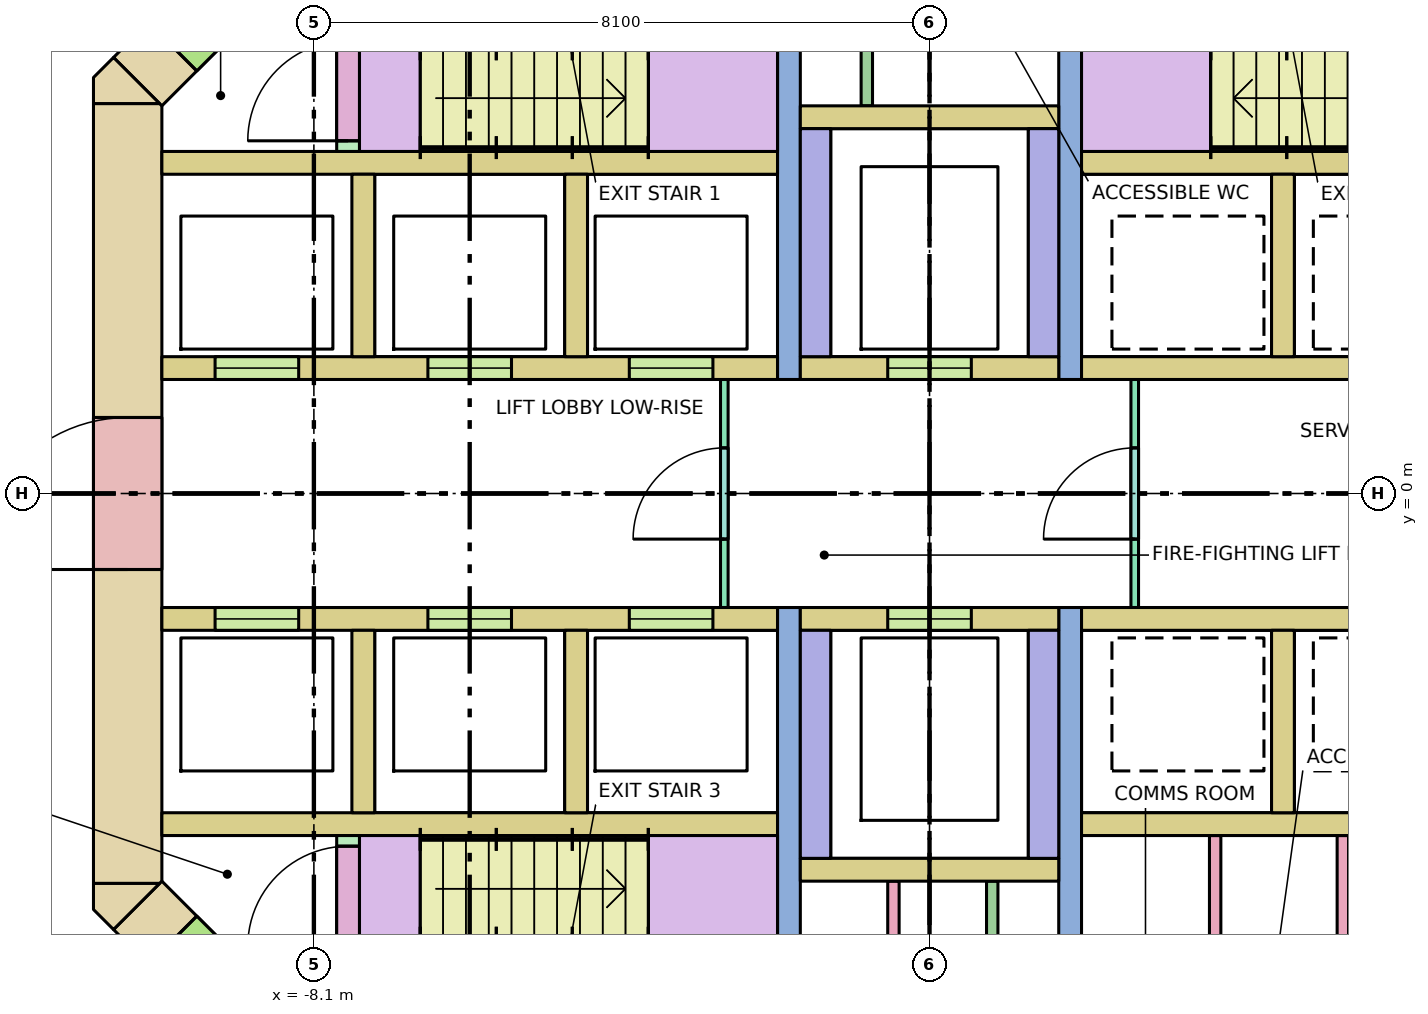
"""IFC4 building model, lengths in metres.
Left out: names, types, materials, properties, quantities, classifications, styles, units other than length and angle.
Written with IfcOpenShell. Run it as: python <this file> out.ifc"""

import sys

from ifc_helpers import new_model, si_unit, direction, frame, frame_2d, origin, place, context, subcontext, project, spatial, polyline, rectangle, outline, extrude, element, fill, save


model = new_model("IFC4")
c1 = context("Model", 3, precision=1e-05, world=origin(), true_north=direction((0.0, 1.0)))
c2 = subcontext(c1, "Body", "Model", "MODEL_VIEW")
j1 = project(units=[si_unit("LENGTHUNIT", "METRE"), si_unit("PLANEANGLEUNIT", "RADIAN")], contexts=[c1])
p1 = place(None, origin())
s1 = spatial("IfcSite", under=j1, at=p1, CompositionType="ELEMENT")
p2 = place(p1, origin())
s2 = spatial("IfcBuilding", under=s1, at=p2, CompositionType="ELEMENT")
p3 = place(p2, frame((0.0, 0.0, 79.0)))
s3 = spatial("IfcBuildingStorey", under=s2, at=p3, CompositionType="ELEMENT", Elevation=79.0)
p4 = place(p3, frame((-10.55, -5.13, -0.28), z_axis=(0.0, 0.0, 1.0), x_axis=(0.0, 1.0, 0.0)))
e1 = element("IfcWall", 1, at=p4, inside=s3, PredefinedType="SHEAR", context=c2, shape_type="SweptSolid", body=[
    extrude(rectangle(XDim=10.26, YDim=0.9, at=frame_2d((5.13, 0.0))), origin(), (0.0, 0.0, 1.0), 7.6),
])
p5 = place(p4, frame((4.13, 0.0, 0.28)))
e2 = element("IfcOpeningElement", 2, at=p5, cuts=e1, PredefinedType="OPENING", context=c2, shape_type="SweptSolid", body=[
    extrude(rectangle(XDim=2.0, YDim=2.1, at=frame_2d((1.0, 1.05))), frame((0.0, 0.46, 0.0), z_axis=(0.0, -1.0, 0.0), x_axis=(1.0, 0.0, 0.0)), (0.0, 0.0, 1.0), 0.92),
])
p6 = place(p3, frame((-10.418, 5.418, -0.28), z_axis=(0.0, 0.0, 1.0), x_axis=(0.707106781187, 0.707106781187, 0.0)))
e3 = element("IfcWall", 3, at=p6, inside=s3, PredefinedType="SHEAR", context=c2, shape_type="SweptSolid", body=[
    extrude(rectangle(XDim=4.243, YDim=0.9, at=frame_2d((2.121, 0.0))), origin(), (0.0, 0.0, 1.0), 7.6),
])
p7 = place(p6, frame((0.65, 0.0, 0.28)))
e4 = element("IfcOpeningElement", 4, at=p7, cuts=e3, PredefinedType="OPENING", context=c2, shape_type="SweptSolid", body=[
    extrude(rectangle(XDim=1.2, YDim=2.1, at=frame_2d((0.6, 1.05))), frame((0.0, 0.46, 0.0), z_axis=(0.0, -1.0, 0.0), x_axis=(1.0, 0.0, 0.0)), (0.0, 0.0, 1.0), 0.92),
])
p8 = place(p3, frame((-7.418, -8.418, -0.28), z_axis=(0.0, 0.0, 1.0), x_axis=(-0.707106781187, 0.707106781187, 0.0)))
e5 = element("IfcWall", 5, at=p8, inside=s3, PredefinedType="SHEAR", context=c2, shape_type="SweptSolid", body=[
    extrude(rectangle(XDim=4.243, YDim=0.9, at=frame_2d((2.121, 0.0))), origin(), (0.0, 0.0, 1.0), 7.6),
])
p9 = place(p8, frame((2.393, 0.0, 0.28)))
e6 = element("IfcOpeningElement", 6, at=p9, cuts=e5, PredefinedType="OPENING", context=c2, shape_type="SweptSolid", body=[
    extrude(rectangle(XDim=1.2, YDim=2.1, at=frame_2d((0.6, 1.05))), frame((0.0, 0.46, 0.0), z_axis=(0.0, -1.0, 0.0), x_axis=(1.0, 0.0, 0.0)), (0.0, 0.0, 1.0), 0.92),
])
p10 = place(p3, frame((0.0, 0.0, -0.28)))
e7 = element("IfcWall", 7, at=p10, inside=s3, PredefinedType="SHEAR", context=c2, shape_type="SweptSolid", body=[
    extrude(outline(polyline([(-11.0, -5.473), (-11.0, -5.13), (-10.13, -5.13), (-10.736, -5.736), (-11.0, -5.473)])), origin(), (0.0, 0.0, 1.0), 7.6),
])
p11 = place(p3, frame((0.0, 0.0, -0.28)))
e8 = element("IfcWall", 8, at=p11, inside=s3, PredefinedType="SHEAR", context=c2, shape_type="SweptSolid", body=[
    extrude(outline(polyline([(-10.736, 5.736), (-10.13, 5.13), (-11.0, 5.13), (-11.0, 5.473), (-10.736, 5.736)])), origin(), (0.0, 0.0, 1.0), 7.6),
])
for number, where, z_axis, x_axis in (
    (9, (-10.1, 4.35, 0.0), (0.0, 0.0, 1.0), (1.0, 0.0, 0.0)),
    (10, (-10.1, -4.35, 0.0), (0.0, 0.0, 1.0), (1.0, 0.0, 0.0)),
    (11, (2.0, 4.35, 0.0), (0.0, 0.0, 1.0), (1.0, 0.0, 0.0)),
    (12, (2.0, -4.35, 0.0), (0.0, 0.0, 1.0), (1.0, 0.0, 0.0)),
):
    element("IfcWall", number, at=place(p3, frame(where, z_axis=z_axis, x_axis=x_axis)), inside=s3, PredefinedType="SOLIDWALL", context=c2, shape_type="SweptSolid", body=[
        extrude(rectangle(XDim=8.1, YDim=0.3, at=frame_2d((4.05, 0.0))), origin(), (0.0, 0.0, 1.0), 7.32),
    ])
p12 = place(p3, frame((-10.1, 1.65, 0.0), z_axis=(0.0, 0.0, 1.0), x_axis=(1.0, 0.0, 0.0)))
e13 = element("IfcWall", 13, at=p12, inside=s3, PredefinedType="SOLIDWALL", context=c2, shape_type="SweptSolid", body=[
    extrude(rectangle(XDim=8.1, YDim=0.3, at=frame_2d((4.05, 0.0))), origin(), (0.0, 0.0, 1.0), 7.32),
])
p13 = place(p12, frame((0.7, 0.0, 0.0)))
e14 = element("IfcOpeningElement", 14, at=p13, cuts=e13, PredefinedType="OPENING", context=c2, shape_type="SweptSolid", body=[
    extrude(rectangle(XDim=1.1, YDim=2.1, at=frame_2d((0.55, 1.05))), frame((0.0, 0.16, 0.0), z_axis=(0.0, -1.0, 0.0), x_axis=(1.0, 0.0, 0.0)), (0.0, 0.0, 1.0), 0.32),
])
p14 = place(p12, frame((3.5, 0.0, 0.0)))
e15 = element("IfcOpeningElement", 15, at=p14, cuts=e13, PredefinedType="OPENING", context=c2, shape_type="SweptSolid", body=[
    extrude(rectangle(XDim=1.1, YDim=2.1, at=frame_2d((0.55, 1.05))), frame((0.0, 0.16, 0.0), z_axis=(0.0, -1.0, 0.0), x_axis=(1.0, 0.0, 0.0)), (0.0, 0.0, 1.0), 0.32),
])
p15 = place(p12, frame((6.15, 0.0, 0.0)))
e16 = element("IfcOpeningElement", 16, at=p15, cuts=e13, PredefinedType="OPENING", context=c2, shape_type="SweptSolid", body=[
    extrude(rectangle(XDim=1.1, YDim=2.1, at=frame_2d((0.55, 1.05))), frame((0.0, 0.16, 0.0), z_axis=(0.0, -1.0, 0.0), x_axis=(1.0, 0.0, 0.0)), (0.0, 0.0, 1.0), 0.32),
])
p16 = place(p3, frame((-10.1, -1.65, 0.0), z_axis=(0.0, 0.0, 1.0), x_axis=(1.0, 0.0, 0.0)))
e17 = element("IfcWall", 17, at=p16, inside=s3, PredefinedType="SOLIDWALL", context=c2, shape_type="SweptSolid", body=[
    extrude(rectangle(XDim=8.1, YDim=0.3, at=frame_2d((4.05, 0.0))), origin(), (0.0, 0.0, 1.0), 7.32),
])
p17 = place(p16, frame((0.7, 0.0, 0.0)))
e18 = element("IfcOpeningElement", 18, at=p17, cuts=e17, PredefinedType="OPENING", context=c2, shape_type="SweptSolid", body=[
    extrude(rectangle(XDim=1.1, YDim=2.1, at=frame_2d((0.55, 1.05))), frame((0.0, 0.16, 0.0), z_axis=(0.0, -1.0, 0.0), x_axis=(1.0, 0.0, 0.0)), (0.0, 0.0, 1.0), 0.32),
])
p18 = place(p16, frame((3.5, 0.0, 0.0)))
e19 = element("IfcOpeningElement", 19, at=p18, cuts=e17, PredefinedType="OPENING", context=c2, shape_type="SweptSolid", body=[
    extrude(rectangle(XDim=1.1, YDim=2.1, at=frame_2d((0.55, 1.05))), frame((0.0, 0.16, 0.0), z_axis=(0.0, -1.0, 0.0), x_axis=(1.0, 0.0, 0.0)), (0.0, 0.0, 1.0), 0.32),
])
p19 = place(p16, frame((6.15, 0.0, 0.0)))
e20 = element("IfcOpeningElement", 20, at=p19, cuts=e17, PredefinedType="OPENING", context=c2, shape_type="SweptSolid", body=[
    extrude(rectangle(XDim=1.1, YDim=2.1, at=frame_2d((0.55, 1.05))), frame((0.0, 0.16, 0.0), z_axis=(0.0, -1.0, 0.0), x_axis=(1.0, 0.0, 0.0)), (0.0, 0.0, 1.0), 0.32),
])
for number, where, z_axis, x_axis in (
    (21, (2.0, 1.65, 0.0), (0.0, 0.0, 1.0), (1.0, 0.0, 0.0)),
    (22, (2.0, -1.65, 0.0), (0.0, 0.0, 1.0), (1.0, 0.0, 0.0)),
):
    element("IfcWall", number, at=place(p3, frame(where, z_axis=z_axis, x_axis=x_axis)), inside=s3, PredefinedType="SOLIDWALL", context=c2, shape_type="SweptSolid", body=[
        extrude(rectangle(XDim=8.1, YDim=0.3, at=frame_2d((4.05, 0.0))), origin(), (0.0, 0.0, 1.0), 7.32),
    ])
for number, where, z_axis, x_axis in (
    (23, (-7.45, 1.8, 0.0), (0.0, 0.0, 1.0), (0.0, 1.0, 0.0)),
    (24, (-7.45, -4.2, 0.0), (0.0, 0.0, 1.0), (0.0, 1.0, 0.0)),
    (25, (-4.65, 1.8, 0.0), (0.0, 0.0, 1.0), (0.0, 1.0, 0.0)),
    (26, (-4.65, -4.2, 0.0), (0.0, 0.0, 1.0), (0.0, 1.0, 0.0)),
    (27, (4.65, 1.8, 0.0), (0.0, 0.0, 1.0), (0.0, 1.0, 0.0)),
    (28, (4.65, -4.2, 0.0), (0.0, 0.0, 1.0), (0.0, 1.0, 0.0)),
):
    element("IfcWall", number, at=place(p3, frame(where, z_axis=z_axis, x_axis=x_axis)), inside=s3, PredefinedType="SOLIDWALL", context=c2, shape_type="SweptSolid", body=[
        extrude(rectangle(XDim=2.4, YDim=0.3, at=frame_2d((1.2, 0.0))), origin(), (0.0, 0.0, 1.0), 7.32),
    ])
for number, where, z_axis, x_axis in (
    (29, (-1.85, 1.5, 0.0), (0.0, 0.0, 1.0), (0.0, 1.0, 0.0)),
    (30, (-1.85, -8.1, 0.0), (0.0, 0.0, 1.0), (0.0, 1.0, 0.0)),
    (31, (1.85, 1.5, 0.0), (0.0, 0.0, 1.0), (0.0, 1.0, 0.0)),
    (32, (1.85, -8.1, 0.0), (0.0, 0.0, 1.0), (0.0, 1.0, 0.0)),
):
    element("IfcWall", number, at=place(p3, frame(where, z_axis=z_axis, x_axis=x_axis)), inside=s3, PredefinedType="SHEAR", context=c2, shape_type="SweptSolid", body=[
        extrude(rectangle(XDim=6.6, YDim=0.3, at=frame_2d((3.3, 0.0))), origin(), (0.0, 0.0, 1.0), 7.32),
    ])
p20 = place(p3, frame((-1.7, 1.65, 0.0), z_axis=(0.0, 0.0, 1.0), x_axis=(1.0, 0.0, 0.0)))
e33 = element("IfcWall", 33, at=p20, inside=s3, PredefinedType="SOLIDWALL", context=c2, shape_type="SweptSolid", body=[
    extrude(rectangle(XDim=3.4, YDim=0.3, at=frame_2d((1.7, 0.0))), origin(), (0.0, 0.0, 1.0), 7.32),
])
p21 = place(p20, frame((1.15, 0.0, 0.0)))
e34 = element("IfcOpeningElement", 34, at=p21, cuts=e33, PredefinedType="OPENING", context=c2, shape_type="SweptSolid", body=[
    extrude(rectangle(XDim=1.1, YDim=2.1, at=frame_2d((0.55, 1.05))), frame((0.0, 0.16, 0.0), z_axis=(0.0, -1.0, 0.0), x_axis=(1.0, 0.0, 0.0)), (0.0, 0.0, 1.0), 0.32),
])
p22 = place(p3, frame((-1.7, -1.65, 0.0), z_axis=(0.0, 0.0, 1.0), x_axis=(1.0, 0.0, 0.0)))
e35 = element("IfcWall", 35, at=p22, inside=s3, PredefinedType="SOLIDWALL", context=c2, shape_type="SweptSolid", body=[
    extrude(rectangle(XDim=3.4, YDim=0.3, at=frame_2d((1.7, 0.0))), origin(), (0.0, 0.0, 1.0), 7.32),
])
p23 = place(p22, frame((1.15, 0.0, 0.0)))
e36 = element("IfcOpeningElement", 36, at=p23, cuts=e35, PredefinedType="OPENING", context=c2, shape_type="SweptSolid", body=[
    extrude(rectangle(XDim=1.1, YDim=2.1, at=frame_2d((0.55, 1.05))), frame((0.0, 0.16, 0.0), z_axis=(0.0, -1.0, 0.0), x_axis=(1.0, 0.0, 0.0)), (0.0, 0.0, 1.0), 0.32),
])
for number, where, z_axis, x_axis in (
    (37, (-1.5, 1.8, 0.0), (0.0, 0.0, 1.0), (0.0, 1.0, 0.0)),
    (38, (-1.5, -4.8, 0.0), (0.0, 0.0, 1.0), (0.0, 1.0, 0.0)),
    (39, (1.5, 1.8, 0.0), (0.0, 0.0, 1.0), (0.0, 1.0, 0.0)),
    (40, (1.5, -4.8, 0.0), (0.0, 0.0, 1.0), (0.0, 1.0, 0.0)),
):
    element("IfcWall", number, at=place(p3, frame(where, z_axis=z_axis, x_axis=x_axis)), inside=s3, PredefinedType="SOLIDWALL", context=c2, shape_type="SweptSolid", body=[
        extrude(rectangle(XDim=3.0, YDim=0.4, at=frame_2d((1.5, 0.0))), origin(), (0.0, 0.0, 1.0), 7.32),
    ])
for number, where, z_axis, x_axis in (
    (41, (-1.7, 4.95, 0.0), (0.0, 0.0, 1.0), (1.0, 0.0, 0.0)),
    (42, (-1.7, -4.95, 0.0), (0.0, 0.0, 1.0), (1.0, 0.0, 0.0)),
):
    element("IfcWall", number, at=place(p3, frame(where, z_axis=z_axis, x_axis=x_axis)), inside=s3, PredefinedType="SOLIDWALL", context=c2, shape_type="SweptSolid", body=[
        extrude(rectangle(XDim=3.4, YDim=0.3, at=frame_2d((1.7, 0.0))), origin(), (0.0, 0.0, 1.0), 7.32),
    ])
p24 = place(p3, frame((-7.65, 4.5, 0.0), z_axis=(0.0, 0.0, 1.0), x_axis=(0.0, 1.0, 0.0)))
e43 = element("IfcWall", 43, at=p24, inside=s3, PredefinedType="SHEAR", context=c2, shape_type="SweptSolid", body=[
    extrude(rectangle(XDim=3.14, YDim=0.3, at=frame_2d((1.57, 0.0))), origin(), (0.0, 0.0, 1.0), 7.32),
])
p25 = place(p24, frame((0.14, 0.0, 0.0)))
e44 = element("IfcOpeningElement", 44, at=p25, cuts=e43, PredefinedType="OPENING", context=c2, shape_type="SweptSolid", body=[
    extrude(rectangle(XDim=1.32, YDim=2.1, at=frame_2d((0.66, 1.05))), frame((0.0, 0.16, 0.0), z_axis=(0.0, -1.0, 0.0), x_axis=(1.0, 0.0, 0.0)), (0.0, 0.0, 1.0), 0.32),
])
p26 = place(p3, frame((-7.65, -7.64, 0.0), z_axis=(0.0, 0.0, 1.0), x_axis=(0.0, 1.0, 0.0)))
e45 = element("IfcWall", 45, at=p26, inside=s3, PredefinedType="SHEAR", context=c2, shape_type="SweptSolid", body=[
    extrude(rectangle(XDim=3.14, YDim=0.3, at=frame_2d((1.57, 0.0))), origin(), (0.0, 0.0, 1.0), 7.32),
])
p27 = place(p26, frame((1.68, 0.0, 0.0)))
e46 = element("IfcOpeningElement", 46, at=p27, cuts=e45, PredefinedType="OPENING", context=c2, shape_type="SweptSolid", body=[
    extrude(rectangle(XDim=1.32, YDim=2.1, at=frame_2d((0.66, 1.05))), frame((0.0, 0.16, 0.0), z_axis=(0.0, -1.0, 0.0), x_axis=(1.0, 0.0, 0.0)), (0.0, 0.0, 1.0), 0.32),
])
p28 = place(p3, frame((-2.7, -1.5, 0.0), z_axis=(0.0, 0.0, 1.0), x_axis=(0.0, 1.0, 0.0)))
e47 = element("IfcWall", 47, at=p28, inside=s3, PredefinedType="PARTITIONING", context=c2, shape_type="SweptSolid", body=[
    extrude(rectangle(XDim=3.0, YDim=0.1, at=frame_2d((1.5, 0.0))), origin(), (0.0, 0.0, 1.0), 7.32),
])
p29 = place(p28, frame((0.9, 0.0, 0.0)))
e48 = element("IfcOpeningElement", 48, at=p29, cuts=e47, PredefinedType="OPENING", context=c2, shape_type="SweptSolid", body=[
    extrude(rectangle(XDim=1.2, YDim=2.1, at=frame_2d((0.6, 1.05))), frame((0.0, 0.06, 0.0), z_axis=(0.0, -1.0, 0.0), x_axis=(1.0, 0.0, 0.0)), (0.0, 0.0, 1.0), 0.12),
])
p30 = place(p3, frame((2.7, -1.5, 0.0), z_axis=(0.0, 0.0, 1.0), x_axis=(0.0, 1.0, 0.0)))
e49 = element("IfcWall", 49, at=p30, inside=s3, PredefinedType="PARTITIONING", context=c2, shape_type="SweptSolid", body=[
    extrude(rectangle(XDim=3.0, YDim=0.1, at=frame_2d((1.5, 0.0))), origin(), (0.0, 0.0, 1.0), 7.32),
])
p31 = place(p30, frame((0.9, 0.0, 0.0)))
e50 = element("IfcOpeningElement", 50, at=p31, cuts=e49, PredefinedType="OPENING", context=c2, shape_type="SweptSolid", body=[
    extrude(rectangle(XDim=1.2, YDim=2.1, at=frame_2d((0.6, 1.05))), frame((0.0, 0.06, 0.0), z_axis=(0.0, -1.0, 0.0), x_axis=(1.0, 0.0, 0.0)), (0.0, 0.0, 1.0), 0.12),
])
for number, where, z_axis, x_axis in (
    (51, (-0.825, 5.1, 0.0), (0.0, 0.0, 1.0), (0.0, 1.0, 0.0)),
    (52, (0.825, -8.1, 0.0), (0.0, 0.0, 1.0), (0.0, 1.0, 0.0)),
    (53, (-0.475, -8.1, 0.0), (0.0, 0.0, 1.0), (0.0, 1.0, 0.0)),
):
    element("IfcWall", number, at=place(p3, frame(where, z_axis=z_axis, x_axis=x_axis)), inside=s3, PredefinedType="PARTITIONING", context=c2, shape_type="SweptSolid", body=[
        extrude(rectangle(XDim=3.0, YDim=0.15, at=frame_2d((1.5, 0.0))), origin(), (0.0, 0.0, 1.0), 7.32),
    ])
for number, where, z_axis, x_axis in (
    (54, (3.758, -8.1, 0.0), (0.0, 0.0, 1.0), (0.0, 1.0, 0.0)),
    (55, (5.438, -8.1, 0.0), (0.0, 0.0, 1.0), (0.0, 1.0, 0.0)),
):
    element("IfcWall", number, at=place(p3, frame(where, z_axis=z_axis, x_axis=x_axis)), inside=s3, PredefinedType="PARTITIONING", context=c2, shape_type="SweptSolid", body=[
        extrude(rectangle(XDim=3.6, YDim=0.15, at=frame_2d((1.8, 0.0))), origin(), (0.0, 0.0, 1.0), 7.32),
    ])
p32 = place(p13, origin())
e56 = element("IfcDoor", 56, at=p32, inside=s3, OperationType="DOUBLE_DOOR_SLIDING", PredefinedType="DOOR", context=c2, shape_type="SweptSolid", body=[
    extrude(rectangle(XDim=1.1, YDim=2.1, at=frame_2d((0.55, 1.05))), frame((0.0, 0.025, 0.0), z_axis=(0.0, -1.0, 0.0), x_axis=(1.0, 0.0, 0.0)), (0.0, 0.0, 1.0), 0.05),
])
fill(e14, e56)
p33 = place(p14, origin())
e57 = element("IfcDoor", 57, at=p33, inside=s3, OperationType="DOUBLE_DOOR_SLIDING", PredefinedType="DOOR", context=c2, shape_type="SweptSolid", body=[
    extrude(rectangle(XDim=1.1, YDim=2.1, at=frame_2d((0.55, 1.05))), frame((0.0, 0.025, 0.0), z_axis=(0.0, -1.0, 0.0), x_axis=(1.0, 0.0, 0.0)), (0.0, 0.0, 1.0), 0.05),
])
fill(e15, e57)
p34 = place(p15, origin())
e58 = element("IfcDoor", 58, at=p34, inside=s3, OperationType="DOUBLE_DOOR_SLIDING", PredefinedType="DOOR", context=c2, shape_type="SweptSolid", body=[
    extrude(rectangle(XDim=1.1, YDim=2.1, at=frame_2d((0.55, 1.05))), frame((0.0, 0.025, 0.0), z_axis=(0.0, -1.0, 0.0), x_axis=(1.0, 0.0, 0.0)), (0.0, 0.0, 1.0), 0.05),
])
fill(e16, e58)
p35 = place(p17, origin())
e59 = element("IfcDoor", 59, at=p35, inside=s3, OperationType="DOUBLE_DOOR_SLIDING", PredefinedType="DOOR", context=c2, shape_type="SweptSolid", body=[
    extrude(rectangle(XDim=1.1, YDim=2.1, at=frame_2d((0.55, 1.05))), frame((0.0, 0.025, 0.0), z_axis=(0.0, -1.0, 0.0), x_axis=(1.0, 0.0, 0.0)), (0.0, 0.0, 1.0), 0.05),
])
fill(e18, e59)
p36 = place(p18, origin())
e60 = element("IfcDoor", 60, at=p36, inside=s3, OperationType="DOUBLE_DOOR_SLIDING", PredefinedType="DOOR", context=c2, shape_type="SweptSolid", body=[
    extrude(rectangle(XDim=1.1, YDim=2.1, at=frame_2d((0.55, 1.05))), frame((0.0, 0.025, 0.0), z_axis=(0.0, -1.0, 0.0), x_axis=(1.0, 0.0, 0.0)), (0.0, 0.0, 1.0), 0.05),
])
fill(e19, e60)
p37 = place(p19, origin())
e61 = element("IfcDoor", 61, at=p37, inside=s3, OperationType="DOUBLE_DOOR_SLIDING", PredefinedType="DOOR", context=c2, shape_type="SweptSolid", body=[
    extrude(rectangle(XDim=1.1, YDim=2.1, at=frame_2d((0.55, 1.05))), frame((0.0, 0.025, 0.0), z_axis=(0.0, -1.0, 0.0), x_axis=(1.0, 0.0, 0.0)), (0.0, 0.0, 1.0), 0.05),
])
fill(e20, e61)
p38 = place(p21, origin())
e62 = element("IfcDoor", 62, at=p38, inside=s3, OperationType="DOUBLE_DOOR_SLIDING", PredefinedType="DOOR", context=c2, shape_type="SweptSolid", body=[
    extrude(rectangle(XDim=1.1, YDim=2.1, at=frame_2d((0.55, 1.05))), frame((0.0, 0.025, 0.0), z_axis=(0.0, -1.0, 0.0), x_axis=(1.0, 0.0, 0.0)), (0.0, 0.0, 1.0), 0.05),
])
fill(e34, e62)
p39 = place(p23, origin())
e63 = element("IfcDoor", 63, at=p39, inside=s3, OperationType="DOUBLE_DOOR_SLIDING", PredefinedType="DOOR", context=c2, shape_type="SweptSolid", body=[
    extrude(rectangle(XDim=1.1, YDim=2.1, at=frame_2d((0.55, 1.05))), frame((0.0, 0.025, 0.0), z_axis=(0.0, -1.0, 0.0), x_axis=(1.0, 0.0, 0.0)), (0.0, 0.0, 1.0), 0.05),
])
fill(e36, e63)
p40 = place(p25, origin())
e64 = element("IfcDoor", 64, at=p40, inside=s3, OperationType="DOUBLE_DOOR_SINGLE_SWING", PredefinedType="DOOR", context=c2, shape_type="SweptSolid", body=[
    extrude(rectangle(XDim=1.32, YDim=2.1, at=frame_2d((0.66, 1.05))), frame((0.0, 0.025, 0.0), z_axis=(0.0, -1.0, 0.0), x_axis=(1.0, 0.0, 0.0)), (0.0, 0.0, 1.0), 0.05),
])
fill(e44, e64)
p41 = place(p27, origin())
e65 = element("IfcDoor", 65, at=p41, inside=s3, OperationType="DOUBLE_DOOR_SINGLE_SWING", PredefinedType="DOOR", context=c2, shape_type="SweptSolid", body=[
    extrude(rectangle(XDim=1.32, YDim=2.1, at=frame_2d((0.66, 1.05))), frame((0.0, 0.025, 0.0), z_axis=(0.0, -1.0, 0.0), x_axis=(1.0, 0.0, 0.0)), (0.0, 0.0, 1.0), 0.05),
])
fill(e46, e65)
p42 = place(p5, origin())
e66 = element("IfcDoor", 66, at=p42, inside=s3, OperationType="DOUBLE_DOOR_SINGLE_SWING", PredefinedType="DOOR", context=c2, shape_type="SweptSolid", body=[
    extrude(rectangle(XDim=2.0, YDim=2.1, at=frame_2d((1.0, 1.05))), frame((0.0, 0.025, 0.0), z_axis=(0.0, -1.0, 0.0), x_axis=(1.0, 0.0, 0.0)), (0.0, 0.0, 1.0), 0.05),
])
fill(e2, e66)
p43 = place(p29, origin())
e67 = element("IfcDoor", 67, at=p43, inside=s3, OperationType="SINGLE_SWING_LEFT", PredefinedType="DOOR", context=c2, shape_type="SweptSolid", body=[
    extrude(rectangle(XDim=1.2, YDim=2.1, at=frame_2d((0.6, 1.05))), frame((0.0, 0.025, 0.0), z_axis=(0.0, -1.0, 0.0), x_axis=(1.0, 0.0, 0.0)), (0.0, 0.0, 1.0), 0.05),
])
fill(e48, e67)
p44 = place(p31, origin())
e68 = element("IfcDoor", 68, at=p44, inside=s3, OperationType="SINGLE_SWING_LEFT", PredefinedType="DOOR", context=c2, shape_type="SweptSolid", body=[
    extrude(rectangle(XDim=1.2, YDim=2.1, at=frame_2d((0.6, 1.05))), frame((0.0, 0.025, 0.0), z_axis=(0.0, -1.0, 0.0), x_axis=(1.0, 0.0, 0.0)), (0.0, 0.0, 1.0), 0.05),
])
fill(e50, e68)
save(model, sys.argv[1])
